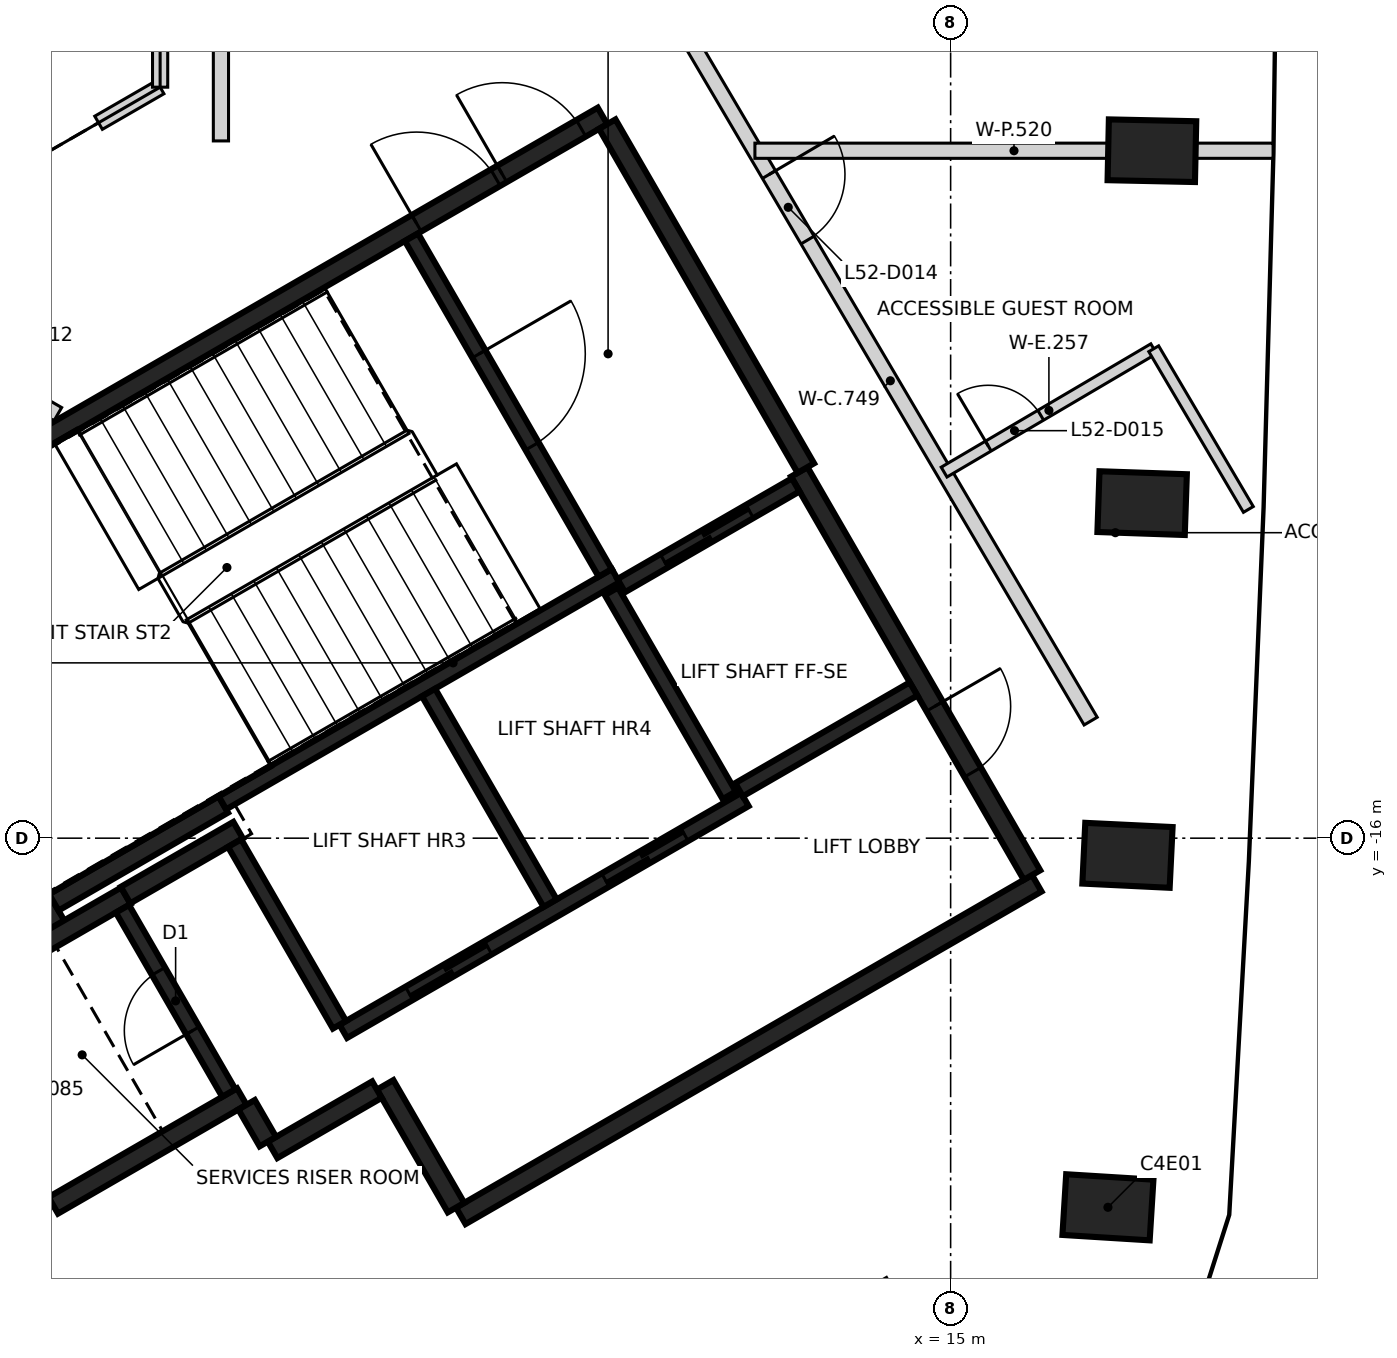
"""IFC4 building model, lengths in metres.
Left out: names, types, materials, properties, quantities, classifications, styles, units other than length and angle.
Written with IfcOpenShell. Run it as: python <this file> out.ifc"""

import sys

from ifc_helpers import new_model, si_unit, direction, frame, frame_2d, origin, origin_2d, place, context, subcontext, project, spatial, rectangle, extrude, element, fill, save


model = new_model("IFC4")
c1 = context("Model", 3, precision=1e-05, world=origin(), true_north=direction((0.0, 1.0)))
c2 = subcontext(c1, "Body", "Model", "MODEL_VIEW")
j1 = project(units=[si_unit("LENGTHUNIT", "METRE"), si_unit("PLANEANGLEUNIT", "RADIAN")], contexts=[c1])
p1 = place(None, origin())
s1 = spatial("IfcSite", under=j1, at=p1, CompositionType="ELEMENT")
p2 = place(p1, origin())
s2 = spatial("IfcBuilding", under=s1, at=p2, CompositionType="ELEMENT")
p3 = place(p2, frame((0.0, 0.0, 208.0)))
s3 = spatial("IfcBuildingStorey", under=s2, at=p3, CompositionType="ELEMENT", Elevation=208.0)
for number, where, z_axis, x_axis in (
    (1, (17.07, -20.856, -0.35), (0.0, 0.0, 1.0), (-0.998, 0.062, 0.0)),
    (2, (17.326, -16.226, -0.35), (0.0, 0.0, 1.0), (-0.999, 0.048, 0.0)),
    (3, (17.519, -11.592, -0.35), (0.0, 0.0, 1.0), (-0.999, 0.034, 0.0)),
    (4, (17.648, -6.956, -0.35), (0.0, 0.0, 1.0), (-1.0, 0.021, 0.0)),
):
    element("IfcColumn", number, at=place(p3, frame(where, z_axis=z_axis, x_axis=x_axis)), inside=s3, PredefinedType="COLUMN", context=c2, shape_type="SweptSolid", body=[
        extrude(rectangle(XDim=1.15, YDim=0.8, at=origin_2d()), origin(), (0.0, 0.0, 1.0), 2.736),
    ])
p4 = place(p3, frame((0.417, -12.273, 0.0), z_axis=(0.0, 0.0, 1.0), x_axis=(0.866021906294, 0.500006057782, 0.0)))
e5 = element("IfcWall", 5, at=p4, inside=s3, PredefinedType="SHEAR", context=c2, shape_type="SweptSolid", body=[
    extrude(rectangle(XDim=11.55, YDim=0.25, at=frame_2d((5.775, 0.0))), origin(), (0.0, 0.0, 1.0), 3.2),
])
p5 = place(p4, frame((10.025, 0.0, 0.0)))
e6 = element("IfcOpeningElement", 6, at=p5, cuts=e5, PredefinedType="OPENING", context=c2, shape_type="SweptSolid", body=[
    extrude(rectangle(XDim=1.2, YDim=2.1, at=frame_2d((0.6, 1.05))), frame((0.0, 0.135, 0.0), z_axis=(0.0, -1.0, 0.0), x_axis=(1.0, 0.0, 0.0)), (0.0, 0.0, 1.0), 0.27),
])
p6 = place(p4, frame((8.725, 0.0, 0.0)))
e7 = element("IfcOpeningElement", 7, at=p6, cuts=e5, PredefinedType="OPENING", context=c2, shape_type="SweptSolid", body=[
    extrude(rectangle(XDim=1.2, YDim=2.1, at=frame_2d((0.6, 1.05))), frame((0.0, 0.135, 0.0), z_axis=(0.0, -1.0, 0.0), x_axis=(1.0, 0.0, 0.0)), (0.0, 0.0, 1.0), 0.27),
])
p7 = place(p3, frame((16.133, -16.594, 0.0), z_axis=(0.0, 0.0, 1.0), x_axis=(-0.866022959057, -0.500004234368, 0.0)))
e8 = element("IfcWall", 8, at=p7, inside=s3, PredefinedType="SHEAR", context=c2, shape_type="SweptSolid", body=[
    extrude(rectangle(XDim=8.75, YDim=0.25, at=frame_2d((4.375, 0.0))), origin(), (0.0, 0.0, 1.0), 3.2),
])
p8 = place(p3, frame((13.008, -11.181, 0.0), z_axis=(0.0, 0.0, 1.0), x_axis=(0.500001955336, -0.866024274868, 0.0)))
e9 = element("IfcWall", 9, at=p8, inside=s3, PredefinedType="SHEAR", context=c2, shape_type="SweptSolid", body=[
    extrude(rectangle(XDim=6.125, YDim=0.25, at=frame_2d((3.062, 0.0))), origin(), (0.0, 0.0, 1.0), 3.2),
])
p9 = place(p8, frame((3.563, 0.0, 0.0)))
e10 = element("IfcOpeningElement", 10, at=p9, cuts=e9, PredefinedType="OPENING", context=c2, shape_type="SweptSolid", body=[
    extrude(rectangle(XDim=1.0, YDim=2.1, at=frame_2d((0.5, 1.05))), frame((0.0, 0.135, 0.0), z_axis=(0.0, -1.0, 0.0), x_axis=(1.0, 0.0, 0.0)), (0.0, 0.0, 1.0), 0.27),
])
p10 = place(p3, frame((3.235, -17.153, 0.0), z_axis=(0.0, 0.0, 1.0), x_axis=(-0.500008851346, 0.866020293397, 0.0)))
e11 = element("IfcWall", 11, at=p10, inside=s3, PredefinedType="SHEAR", context=c2, shape_type="SweptSolid", body=[
    extrude(rectangle(XDim=5.51, YDim=0.25, at=frame_2d((2.755, 0.0))), origin(), (0.0, 0.0, 1.0), 3.2),
])
p11 = place(p3, frame((10.483, -6.606, 0.0), z_axis=(0.0, 0.0, 1.0), x_axis=(0.49999885962, -0.866026062182, 0.0)))
e12 = element("IfcWall", 12, at=p11, inside=s3, PredefinedType="SHEAR", context=c2, shape_type="SweptSolid", body=[
    extrude(rectangle(XDim=5.225, YDim=0.25, at=frame_2d((2.612, 0.0))), origin(), (0.0, 0.0, 1.0), 3.2),
])
p12 = place(p3, frame((3.085, -20.894, 0.0), z_axis=(0.0, 0.0, 1.0), x_axis=(-0.499978833458, 0.866037623948, 0.0)))
e13 = element("IfcWall", 13, at=p12, inside=s3, PredefinedType="SHEAR", context=c2, shape_type="SweptSolid", body=[
    extrude(rectangle(XDim=3.05, YDim=0.25, at=frame_2d((1.525, 0.0))), origin(), (0.0, 0.0, 1.0), 3.2),
])
p13 = place(p3, frame((1.669, -18.19, 0.0), z_axis=(0.0, 0.0, 1.0), x_axis=(0.866042235819, 0.499970844928, 0.0)))
e14 = element("IfcWall", 14, at=p13, inside=s3, PredefinedType="SHEAR", context=c2, shape_type="SweptSolid", body=[
    extrude(rectangle(XDim=2.865, YDim=0.25, at=frame_2d((1.432, 0.0))), origin(), (0.0, 0.0, 1.0), 3.2),
])
p14 = place(p3, frame((5.675, -19.399, 0.0), z_axis=(0.0, 0.0, 1.0), x_axis=(-0.866026637627, -0.499997862916, 0.0)))
e15 = element("IfcWall", 15, at=p14, inside=s3, PredefinedType="SHEAR", context=c2, shape_type="SweptSolid", body=[
    extrude(rectangle(XDim=2.865, YDim=0.25, at=frame_2d((1.432, 0.0))), origin(), (0.0, 0.0, 1.0), 3.2),
])
p15 = place(p3, frame((5.431, -15.556, 0.0), z_axis=(0.0, 0.0, 1.0), x_axis=(-0.866022940537, -0.500004266446, 0.0)))
e16 = element("IfcWall", 16, at=p15, inside=s3, PredefinedType="SHEAR", context=c2, shape_type="SweptSolid", body=[
    extrude(rectangle(XDim=2.575, YDim=0.25, at=frame_2d((1.287, 0.0))), origin(), (0.0, 0.0, 1.0), 3.2),
])
p16 = place(p3, frame((8.493, -20.86, 0.0), z_axis=(0.0, 0.0, 1.0), x_axis=(-0.500039802285, 0.866002422705, 0.0)))
e17 = element("IfcWall", 17, at=p16, inside=s3, PredefinedType="SHEAR", context=c2, shape_type="SweptSolid", body=[
    extrude(rectangle(XDim=1.865, YDim=0.25, at=frame_2d((0.932, 0.0))), origin(), (0.0, 0.0, 1.0), 3.2),
])
p17 = place(p3, frame((4.145, -16.749, 0.0), z_axis=(0.0, 0.0, 1.0), x_axis=(0.866038183914, 0.499977863513, 0.0)))
e18 = element("IfcWall", 18, at=p17, inside=s3, PredefinedType="SHEAR", context=c2, shape_type="SweptSolid", body=[
    extrude(rectangle(XDim=1.71, YDim=0.25, at=frame_2d((0.855, 0.0))), origin(), (0.0, 0.0, 1.0), 3.2),
])
p18 = place(p3, frame((7.452, -19.308, 0.0), z_axis=(0.0, 0.0, 1.0), x_axis=(-0.866044474677, -0.49996696679, 0.0)))
e19 = element("IfcWall", 19, at=p18, inside=s3, PredefinedType="SHEAR", context=c2, shape_type="SweptSolid", body=[
    extrude(rectangle(XDim=1.584, YDim=0.25, at=frame_2d((0.792, 0.0))), origin(), (0.0, 0.0, 1.0), 3.2),
])
p19 = place(p3, frame((6.017, -19.992, 0.0), z_axis=(0.0, 0.0, 1.0), x_axis=(-0.500364886717, 0.865814633822, 0.0)))
e20 = element("IfcWall", 20, at=p19, inside=s3, PredefinedType="SHEAR", context=c2, shape_type="SweptSolid", body=[
    extrude(rectangle(XDim=0.559, YDim=0.25, at=frame_2d((0.28, 0.0))), origin(), (0.0, 0.0, 1.0), 3.2),
])
p20 = place(p3, frame((5.419, -15.534, 0.0), z_axis=(0.0, 0.0, 1.0), x_axis=(0.866029065029, 0.499993658486, 0.0)))
e21 = element("IfcWall", 21, at=p20, inside=s3, PredefinedType="SHEAR", context=c2, shape_type="SweptSolid", body=[
    extrude(rectangle(XDim=5.974, YDim=0.2, at=frame_2d((2.987, 0.0))), origin(), (0.0, 0.0, 1.0), 3.2),
])
p21 = place(p3, frame((7.01, -18.542, 0.0), z_axis=(0.0, 0.0, 1.0), x_axis=(0.866030299012, 0.499991521122, 0.0)))
e22 = element("IfcWall", 22, at=p21, inside=s3, PredefinedType="SHEAR", context=c2, shape_type="SweptSolid", body=[
    extrude(rectangle(XDim=6.1, YDim=0.2, at=frame_2d((3.05, 0.0))), origin(), (0.0, 0.0, 1.0), 3.2),
])
p22 = place(p21, frame((1.0, 0.0, 0.0)))
e23 = element("IfcOpeningElement", 23, at=p22, cuts=e22, PredefinedType="OPENING", context=c2, shape_type="SweptSolid", body=[
    extrude(rectangle(XDim=1.2, YDim=2.1, at=frame_2d((0.6, 1.05))), frame((0.0, 0.11, 0.0), z_axis=(0.0, -1.0, 0.0), x_axis=(1.0, 0.0, 0.0)), (0.0, 0.0, 1.0), 0.22),
])
p23 = place(p21, frame((3.982, 0.0, 0.0)))
e24 = element("IfcOpeningElement", 24, at=p23, cuts=e22, PredefinedType="OPENING", context=c2, shape_type="SweptSolid", body=[
    extrude(rectangle(XDim=1.2, YDim=2.1, at=frame_2d((0.6, 1.05))), frame((0.0, 0.11, 0.0), z_axis=(0.0, -1.0, 0.0), x_axis=(1.0, 0.0, 0.0)), (0.0, 0.0, 1.0), 0.22),
])
p24 = place(p3, frame((7.906, -8.094, 0.0), z_axis=(0.0, 0.0, 1.0), x_axis=(0.500027839223, -0.866009330205, 0.0)))
e25 = element("IfcWall", 25, at=p24, inside=s3, PredefinedType="SHEAR", context=c2, shape_type="SweptSolid", body=[
    extrude(rectangle(XDim=5.098, YDim=0.2, at=frame_2d((2.549, 0.0))), origin(), (0.0, 0.0, 1.0), 3.2),
])
p25 = place(p24, frame((1.774, 0.0, 0.0)))
e26 = element("IfcOpeningElement", 26, at=p25, cuts=e25, PredefinedType="OPENING", context=c2, shape_type="SweptSolid", body=[
    extrude(rectangle(XDim=1.4, YDim=2.1, at=frame_2d((0.7, 1.05))), frame((0.0, 0.11, 0.0), z_axis=(0.0, -1.0, 0.0), x_axis=(1.0, 0.0, 0.0)), (0.0, 0.0, 1.0), 0.22),
])
p26 = place(p3, frame((8.132, -14.084, 0.0), z_axis=(0.0, 0.0, 1.0), x_axis=(0.499997778408, -0.866026686418, 0.0)))
e27 = element("IfcWall", 27, at=p26, inside=s3, PredefinedType="SHEAR", context=c2, shape_type="SweptSolid", body=[
    extrude(rectangle(XDim=3.198, YDim=0.2, at=frame_2d((1.599, 0.0))), origin(), (0.0, 0.0, 1.0), 3.2),
])
p27 = place(p3, frame((5.503, -19.352, 0.0), z_axis=(0.0, 0.0, 1.0), x_axis=(-0.499986818241, 0.866033014143, 0.0)))
e28 = element("IfcWall", 28, at=p27, inside=s3, PredefinedType="SHEAR", context=c2, shape_type="SweptSolid", body=[
    extrude(rectangle(XDim=2.798, YDim=0.2, at=frame_2d((1.399, 0.0))), origin(), (0.0, 0.0, 1.0), 3.2),
])
p28 = place(p27, frame((0.949, 0.0, 0.0)))
e29 = element("IfcOpeningElement", 29, at=p28, cuts=e28, PredefinedType="OPENING", context=c2, shape_type="SweptSolid", body=[
    extrude(rectangle(XDim=0.9, YDim=2.1, at=frame_2d((0.45, 1.05))), frame((0.0, 0.11, 0.0), z_axis=(0.0, -1.0, 0.0), x_axis=(1.0, 0.0, 0.0)), (0.0, 0.0, 1.0), 0.22),
])
p29 = place(p3, frame((6.96, -18.455, 0.0), z_axis=(0.0, 0.0, 1.0), x_axis=(-0.499926705758, 0.866067716099, 0.0)))
e30 = element("IfcWall", 30, at=p29, inside=s3, PredefinedType="SHEAR", context=c2, shape_type="SweptSolid", body=[
    extrude(rectangle(XDim=2.759, YDim=0.2, at=frame_2d((1.38, 0.0))), origin(), (0.0, 0.0, 1.0), 3.2),
])
p30 = place(p3, frame((12.088, -15.437, 0.0), z_axis=(0.0, 0.0, 1.0), x_axis=(-0.500026960575, 0.86600983753, 0.0)))
e31 = element("IfcWall", 31, at=p30, inside=s3, PredefinedType="SHEAR", context=c2, shape_type="SweptSolid", body=[
    extrude(rectangle(XDim=3.1, YDim=0.2, at=frame_2d((1.55, 0.0))), origin(), (0.0, 0.0, 1.0), 3.2),
])
p31 = place(p3, frame((10.666, -12.678, 0.0), z_axis=(0.0, 0.0, 1.0), x_axis=(0.866018407898, 0.500012117035, 0.0)))
e32 = element("IfcWall", 32, at=p31, inside=s3, PredefinedType="SHEAR", context=c2, shape_type="SweptSolid", body=[
    extrude(rectangle(XDim=2.651, YDim=0.2, at=frame_2d((1.325, 0.0))), origin(), (0.0, 0.0, 1.0), 3.2),
])
p32 = place(p31, frame((0.652, 0.0, 0.0)))
e33 = element("IfcOpeningElement", 33, at=p32, cuts=e32, PredefinedType="OPENING", context=c2, shape_type="SweptSolid", body=[
    extrude(rectangle(XDim=1.3, YDim=2.1, at=frame_2d((0.65, 1.05))), frame((0.0, 0.11, 0.0), z_axis=(0.0, -1.0, 0.0), x_axis=(1.0, 0.0, 0.0)), (0.0, 0.0, 1.0), 0.22),
])
p33 = place(p3, frame((14.512, -14.037, 0.0), z_axis=(0.0, 0.0, 1.0), x_axis=(-0.866018407898, -0.500012117035, 0.0)))
e34 = element("IfcWall", 34, at=p33, inside=s3, PredefinedType="SHEAR", context=c2, shape_type="SweptSolid", body=[
    extrude(rectangle(XDim=2.651, YDim=0.2, at=frame_2d((1.325, 0.0))), origin(), (0.0, 0.0, 1.0), 3.2),
])
p34 = place(p3, frame((-8.001, -3.926, 0.0), z_axis=(0.0, 0.0, 1.0), x_axis=(0.866131158271, -0.499816783104, 0.0)))
e35 = element("IfcWall", 35, at=p34, inside=s3, PredefinedType="PARTITIONING", context=c2, shape_type="SweptSolid", body=[
    extrude(rectangle(XDim=12.995, YDim=0.2, at=frame_2d((6.498, 0.0))), origin(), (0.0, 0.0, 1.0), 3.2),
])
p35 = place(p34, frame((6.146, 0.0, 0.0)))
e36 = element("IfcOpeningElement", 36, at=p35, cuts=e35, PredefinedType="OPENING", context=c2, shape_type="SweptSolid", body=[
    extrude(rectangle(XDim=0.95, YDim=2.1, at=frame_2d((0.475, 1.05))), frame((0.0, 0.11, 0.0), z_axis=(0.0, -1.0, 0.0), x_axis=(1.0, 0.0, 0.0)), (0.0, 0.0, 1.0), 0.22),
])
p36 = place(p34, frame((10.472, 0.0, 0.0)))
e37 = element("IfcOpeningElement", 37, at=p36, cuts=e35, PredefinedType="OPENING", context=c2, shape_type="SweptSolid", body=[
    extrude(rectangle(XDim=0.95, YDim=2.1, at=frame_2d((0.475, 1.05))), frame((0.0, 0.11, 0.0), z_axis=(0.0, -1.0, 0.0), x_axis=(1.0, 0.0, 0.0)), (0.0, 0.0, 1.0), 0.22),
])
p37 = place(p3, frame((5.4, -6.827, 0.0), z_axis=(0.0, 0.0, 1.0), x_axis=(0.0, 1.0, 0.0)))
e38 = element("IfcWall", 38, at=p37, inside=s3, PredefinedType="PARTITIONING", context=c2, shape_type="SweptSolid", body=[
    extrude(rectangle(XDim=9.158, YDim=0.2, at=frame_2d((4.579, 0.0))), origin(), (0.0, 0.0, 1.0), 3.2),
])
p38 = place(p37, frame((4.129, 0.0, 0.0)))
e39 = element("IfcOpeningElement", 39, at=p38, cuts=e38, PredefinedType="OPENING", context=c2, shape_type="SweptSolid", body=[
    extrude(rectangle(XDim=0.9, YDim=2.1, at=frame_2d((0.45, 1.05))), frame((0.0, 0.11, 0.0), z_axis=(0.0, -1.0, 0.0), x_axis=(1.0, 0.0, 0.0)), (0.0, 0.0, 1.0), 0.22),
])
p39 = place(p3, frame((11.571, -5.505, 0.0), z_axis=(0.0, 0.0, 1.0), x_axis=(0.507266536157, -0.861789220921, 0.0)))
e40 = element("IfcWall", 40, at=p39, inside=s3, PredefinedType="PARTITIONING", context=c2, shape_type="SweptSolid", body=[
    extrude(rectangle(XDim=10.391, YDim=0.2, at=frame_2d((5.195, 0.0))), origin(), (0.0, 0.0, 1.0), 3.2),
])
p40 = place(p39, frame((2.048, 0.0, 0.0)))
e41 = element("IfcOpeningElement", 41, at=p40, cuts=e40, PredefinedType="OPENING", context=c2, shape_type="SweptSolid", body=[
    extrude(rectangle(XDim=1.0, YDim=2.1, at=frame_2d((0.5, 1.05))), frame((0.0, 0.11, 0.0), z_axis=(0.0, -1.0, 0.0), x_axis=(1.0, 0.0, 0.0)), (0.0, 0.0, 1.0), 0.22),
])
p41 = place(p3, frame((3.79, -6.588, 0.0), z_axis=(0.0, 0.0, 1.0), x_axis=(0.865985641702, 0.500068863623, 0.0)))
e42 = element("IfcWall", 42, at=p41, inside=s3, PredefinedType="PARTITIONING", context=c2, shape_type="SweptSolid", body=[
    extrude(rectangle(XDim=0.935, YDim=0.2, at=frame_2d((0.468, 0.0))), origin(), (0.0, 0.0, 1.0), 3.2),
])
p42 = place(p3, frame((4.6, -6.12, 0.0), z_axis=(0.0, 0.0, 1.0), x_axis=(0.0, 1.0, 0.0)))
e43 = element("IfcWall", 43, at=p42, inside=s3, PredefinedType="PARTITIONING", context=c2, shape_type="SweptSolid", body=[
    extrude(rectangle(XDim=8.451, YDim=0.2, at=frame_2d((4.226, 0.0))), origin(), (0.0, 0.0, 1.0), 3.2),
])
p43 = place(p3, frame((12.425, -6.956, 0.0), z_axis=(0.0, 0.0, 1.0), x_axis=(1.0, 0.0, 0.0)))
e44 = element("IfcWall", 44, at=p43, inside=s3, PredefinedType="PARTITIONING", context=c2, shape_type="SweptSolid", body=[
    extrude(rectangle(XDim=6.817, YDim=0.2, at=frame_2d((3.409, 0.0))), origin(), (0.0, 0.0, 1.0), 3.2),
])
p44 = place(p3, frame((14.914, -11.184, 0.0), z_axis=(0.0, 0.0, 1.0), x_axis=(0.861843987552, 0.507173482273, 0.0)))
e45 = element("IfcWall", 45, at=p44, inside=s3, PredefinedType="PARTITIONING", context=c2, shape_type="SweptSolid", body=[
    extrude(rectangle(XDim=3.2, YDim=0.15, at=frame_2d((1.6, 0.0))), origin(), (0.0, 0.0, 1.0), 2.386),
])
p45 = place(p44, frame((0.675, 0.0, 0.0)))
e46 = element("IfcOpeningElement", 46, at=p45, cuts=e45, PredefinedType="OPENING", context=c2, shape_type="SweptSolid", body=[
    extrude(rectangle(XDim=0.8, YDim=2.1, at=frame_2d((0.4, 1.05))), frame((0.0, 0.085, 0.0), z_axis=(0.0, -1.0, 0.0), x_axis=(1.0, 0.0, 0.0)), (0.0, 0.0, 1.0), 0.17),
])
p46 = place(p3, frame((17.672, -9.561, 0.0), z_axis=(0.0, 0.0, 1.0), x_axis=(0.507424524348, -0.86169620638, 0.0)))
e47 = element("IfcWall", 47, at=p46, inside=s3, PredefinedType="PARTITIONING", context=c2, shape_type="SweptSolid", body=[
    extrude(rectangle(XDim=2.453, YDim=0.15, at=frame_2d((1.227, 0.0))), origin(), (0.0, 0.0, 1.0), 3.2),
])
p47 = place(p32, origin())
e48 = element("IfcDoor", 48, at=p47, inside=s3, OperationType="SLIDING_TO_LEFT", PredefinedType="DOOR", context=c2, shape_type="SweptSolid", body=[
    extrude(rectangle(XDim=1.3, YDim=2.1, at=frame_2d((0.65, 1.05))), frame((0.0, 0.025, 0.0), z_axis=(0.0, -1.0, 0.0), x_axis=(1.0, 0.0, 0.0)), (0.0, 0.0, 1.0), 0.05),
])
fill(e33, e48)
p48 = place(p22, origin())
e49 = element("IfcDoor", 49, at=p48, inside=s3, OperationType="DOUBLE_DOOR_SLIDING", PredefinedType="DOOR", context=c2, shape_type="SweptSolid", body=[
    extrude(rectangle(XDim=1.2, YDim=2.1, at=frame_2d((0.6, 1.05))), frame((0.0, 0.025, 0.0), z_axis=(0.0, -1.0, 0.0), x_axis=(1.0, 0.0, 0.0)), (0.0, 0.0, 1.0), 0.05),
])
fill(e23, e49)
p49 = place(p23, origin())
e50 = element("IfcDoor", 50, at=p49, inside=s3, OperationType="DOUBLE_DOOR_SLIDING", PredefinedType="DOOR", context=c2, shape_type="SweptSolid", body=[
    extrude(rectangle(XDim=1.2, YDim=2.1, at=frame_2d((0.6, 1.05))), frame((0.0, 0.025, 0.0), z_axis=(0.0, -1.0, 0.0), x_axis=(1.0, 0.0, 0.0)), (0.0, 0.0, 1.0), 0.05),
])
fill(e24, e50)
p50 = place(p9, origin())
e51 = element("IfcDoor", 51, at=p50, inside=s3, OperationType="SINGLE_SWING_LEFT", PredefinedType="DOOR", context=c2, shape_type="SweptSolid", body=[
    extrude(rectangle(XDim=1.0, YDim=2.1, at=frame_2d((0.5, 1.05))), frame((0.0, 0.025, 0.0), z_axis=(0.0, -1.0, 0.0), x_axis=(1.0, 0.0, 0.0)), (0.0, 0.0, 1.0), 0.05),
])
fill(e10, e51)
p51 = place(p5, origin())
e52 = element("IfcDoor", 52, at=p51, inside=s3, OperationType="SINGLE_SWING_LEFT", PredefinedType="DOOR", context=c2, shape_type="SweptSolid", body=[
    extrude(rectangle(XDim=1.2, YDim=2.1, at=frame_2d((0.6, 1.05))), frame((0.0, 0.025, 0.0), z_axis=(0.0, -1.0, 0.0), x_axis=(1.0, 0.0, 0.0)), (0.0, 0.0, 1.0), 0.05),
])
fill(e6, e52)
p52 = place(p6, origin())
e53 = element("IfcDoor", 53, at=p52, inside=s3, OperationType="SINGLE_SWING_RIGHT", PredefinedType="DOOR", context=c2, shape_type="SweptSolid", body=[
    extrude(rectangle(XDim=1.2, YDim=2.1, at=frame_2d((0.6, 1.05))), frame((0.0, 0.025, 0.0), z_axis=(0.0, -1.0, 0.0), x_axis=(1.0, 0.0, 0.0)), (0.0, 0.0, 1.0), 0.05),
])
fill(e7, e53)
p53 = place(p25, origin())
e54 = element("IfcDoor", 54, at=p53, inside=s3, OperationType="SINGLE_SWING_LEFT", PredefinedType="DOOR", context=c2, shape_type="SweptSolid", body=[
    extrude(rectangle(XDim=1.4, YDim=2.1, at=frame_2d((0.7, 1.05))), frame((0.0, 0.025, 0.0), z_axis=(0.0, -1.0, 0.0), x_axis=(1.0, 0.0, 0.0)), (0.0, 0.0, 1.0), 0.05),
])
fill(e26, e54)
p54 = place(p28, origin())
e55 = element("IfcDoor", 55, at=p54, inside=s3, OperationType="SINGLE_SWING_RIGHT", PredefinedType="DOOR", context=c2, shape_type="SweptSolid", body=[
    extrude(rectangle(XDim=0.9, YDim=2.1, at=frame_2d((0.45, 1.05))), frame((0.0, 0.025, 0.0), z_axis=(0.0, -1.0, 0.0), x_axis=(1.0, 0.0, 0.0)), (0.0, 0.0, 1.0), 0.05),
])
fill(e29, e55)
p55 = place(p40, origin())
e56 = element("IfcDoor", 56, at=p55, inside=s3, OperationType="SINGLE_SWING_LEFT", PredefinedType="DOOR", context=c2, shape_type="SweptSolid", body=[
    extrude(rectangle(XDim=1.0, YDim=2.1, at=frame_2d((0.5, 1.05))), frame((0.0, 0.025, 0.0), z_axis=(0.0, -1.0, 0.0), x_axis=(1.0, 0.0, 0.0)), (0.0, 0.0, 1.0), 0.05),
])
fill(e41, e56)
p56 = place(p45, origin())
e57 = element("IfcDoor", 57, at=p56, inside=s3, OperationType="SINGLE_SWING_LEFT", PredefinedType="DOOR", context=c2, shape_type="SweptSolid", body=[
    extrude(rectangle(XDim=0.8, YDim=2.1, at=frame_2d((0.4, 1.05))), frame((0.0, 0.025, 0.0), z_axis=(0.0, -1.0, 0.0), x_axis=(1.0, 0.0, 0.0)), (0.0, 0.0, 1.0), 0.05),
])
fill(e46, e57)
save(model, sys.argv[1])
